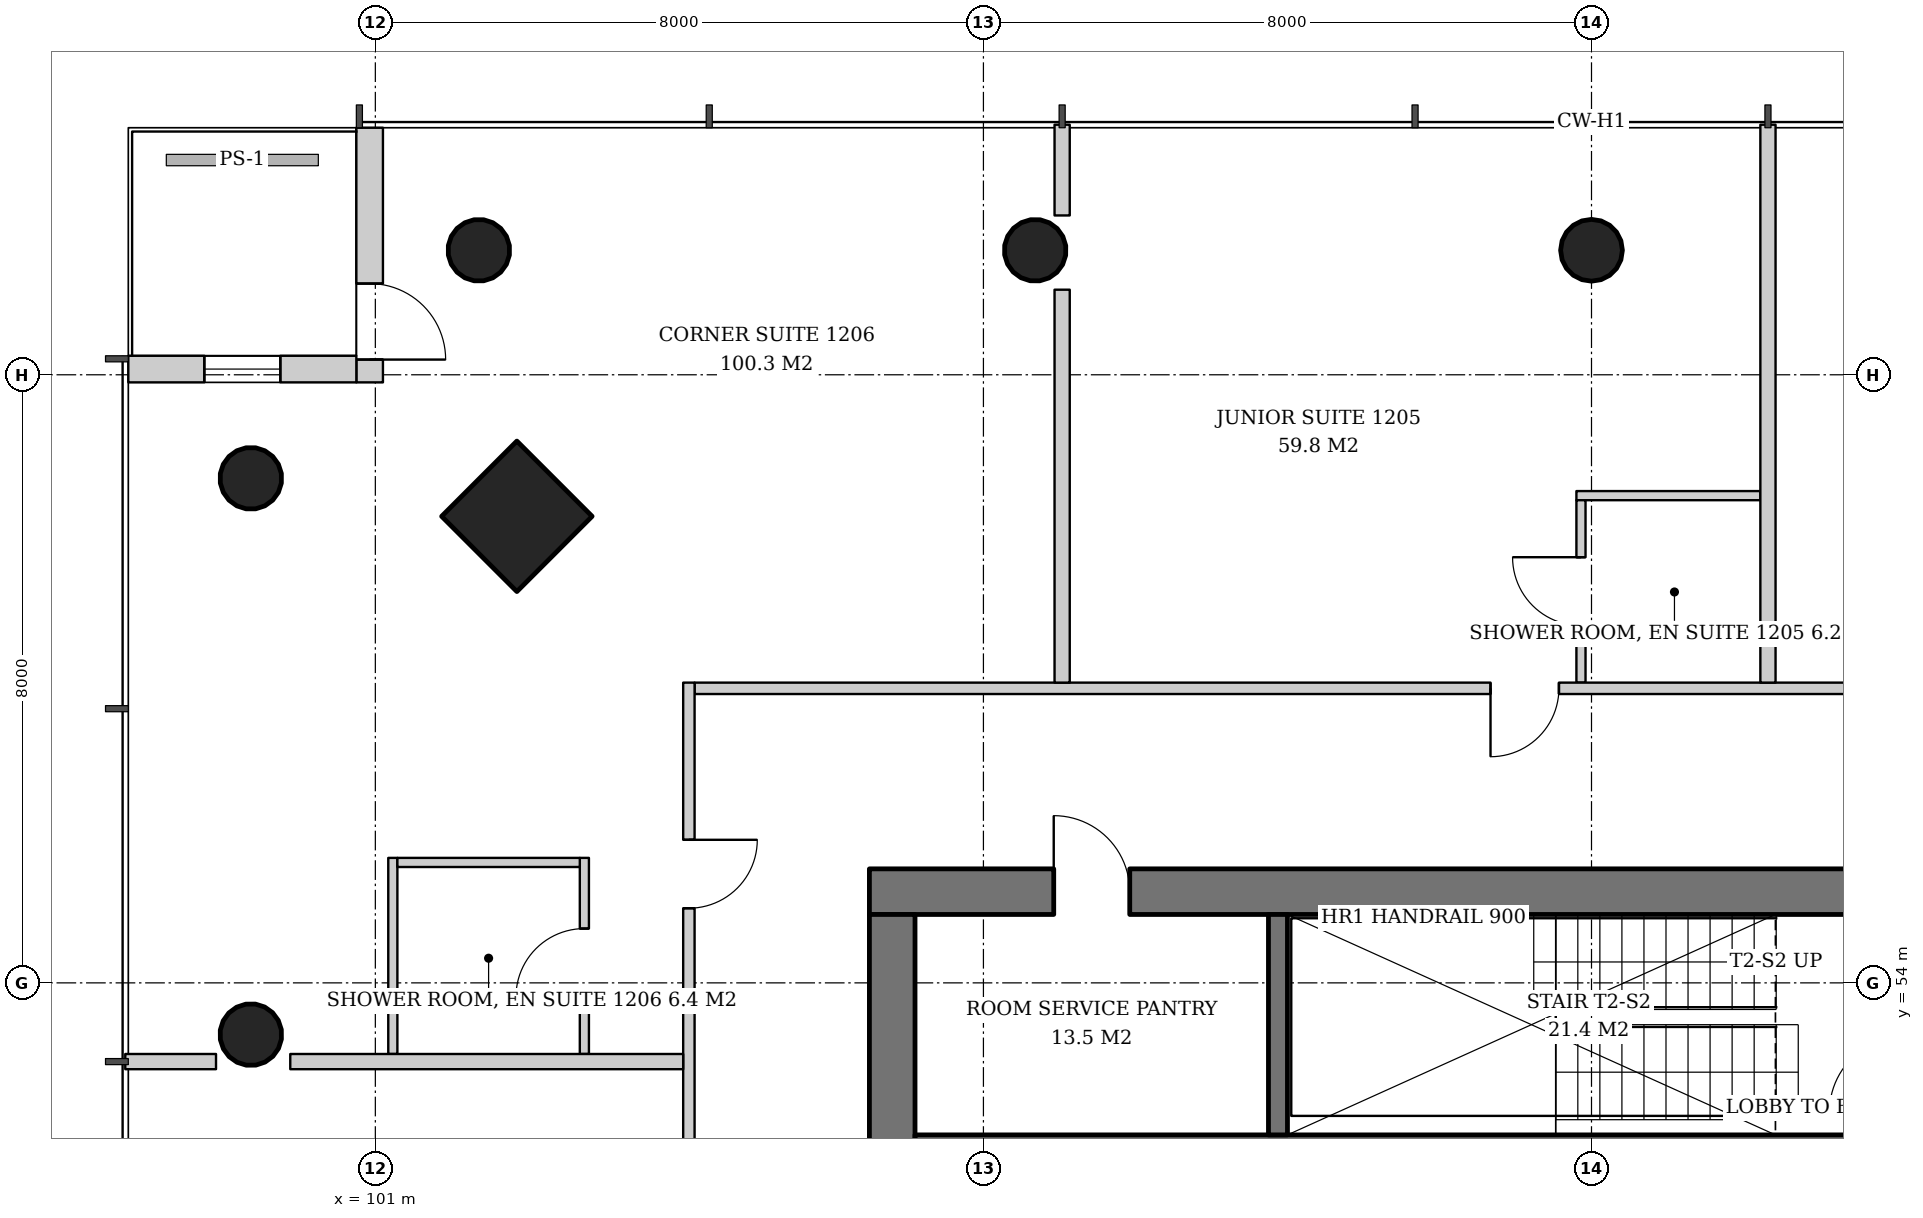
"""IFC4 building model, lengths in metres.
Left out: names, types, materials, properties, quantities, classifications, styles, units other than length and angle.
Written with IfcOpenShell. Run it as: python <this file> out.ifc"""

import sys

from ifc_helpers import new_model, si_unit, direction, frame, frame_2d, origin, origin_2d, place, context, subcontext, project, spatial, rectangle, hollow_circle, extrude, element, fill, save


model = new_model("IFC4")
c1 = context("Model", 3, precision=1e-05, world=origin(), true_north=direction((0.0, 1.0)))
c2 = subcontext(c1, "Body", "Model", "MODEL_VIEW")
j1 = project(units=[si_unit("LENGTHUNIT", "METRE"), si_unit("PLANEANGLEUNIT", "RADIAN")], contexts=[c1])
p1 = place(None, origin())
s1 = spatial("IfcSite", under=j1, at=p1, CompositionType="ELEMENT")
p2 = place(p1, origin())
s2 = spatial("IfcBuilding", under=s1, at=p2, CompositionType="ELEMENT")
p3 = place(p2, frame((0.0, 0.0, 51.4)))
s3 = spatial("IfcBuildingStorey", under=s2, at=p3, CompositionType="ELEMENT", Elevation=51.4)
p4 = place(p3, frame((102.81, 60.19, 0.0), z_axis=(0.043029647111, -0.043029647111, 0.998146732169), x_axis=(0.707106781187, 0.707106781187, 0.0)))
e1 = element("IfcColumn", 1, at=p4, inside=s3, PredefinedType="COLUMN", context=c2, shape_type="SweptSolid", body=[
    extrude(rectangle(XDim=1.4, YDim=1.4, at=origin_2d()), origin(), (0.0, 0.0, 1.0), 3.807),
])
p5 = place(p3, frame((102.31, 63.69, 0.0), z_axis=(0.043029647111, -0.043029647111, 0.998146732169), x_axis=(0.707106781187, 0.707106781187, 0.0)))
e2 = element("IfcColumn", 2, at=p5, inside=s3, PredefinedType="COLUMN", context=c2, shape_type="SweptSolid", body=[
    extrude(hollow_circle(Radius=0.406, WallThickness=0.03, at=origin_2d()), origin(), (0.0, 0.0, 1.0), 3.807),
])
p6 = place(p3, frame((117.0, 63.69, 0.0), z_axis=(0.0, -0.043069538298, 0.999072076915), x_axis=(1.0, 0.0, 0.0)))
e3 = element("IfcColumn", 3, at=p6, inside=s3, PredefinedType="COLUMN", context=c2, shape_type="SweptSolid", body=[
    extrude(hollow_circle(Radius=0.406, WallThickness=0.03, at=origin_2d()), origin(), (0.0, 0.0, 1.0), 3.803),
])
p7 = place(p3, frame((109.655, 63.69, 0.0), z_axis=(0.021497706284, -0.043059584825, 0.998841188968), x_axis=(0.894693706707, 0.446680166538, 0.0)))
e4 = element("IfcColumn", 4, at=p7, inside=s3, PredefinedType="COLUMN", context=c2, shape_type="SweptSolid", body=[
    extrude(hollow_circle(Radius=0.406, WallThickness=0.03, at=origin_2d()), origin(), (0.0, 0.0, 1.0), 3.804),
])
p8 = place(p3, frame((99.31, 60.69, 0.0), z_axis=(0.043029647111, -0.043029647111, 0.998146732169), x_axis=(0.707106781187, 0.707106781187, 0.0)))
e5 = element("IfcColumn", 5, at=p8, inside=s3, PredefinedType="COLUMN", context=c2, shape_type="SweptSolid", body=[
    extrude(hollow_circle(Radius=0.406, WallThickness=0.03, at=origin_2d()), origin(), (0.0, 0.0, 1.0), 3.807),
])
p9 = place(p3, frame((99.31, 53.345, 0.0), z_axis=(0.043059584825, -0.021497706284, 0.998841188968), x_axis=(0.446680166538, 0.894693706707, 0.0)))
e6 = element("IfcColumn", 6, at=p9, inside=s3, PredefinedType="COLUMN", context=c2, shape_type="SweptSolid", body=[
    extrude(hollow_circle(Radius=0.406, WallThickness=0.03, at=origin_2d()), origin(), (0.0, 0.0, 1.0), 3.804),
])
p10 = place(p3, frame((107.5, 55.2, 0.0), z_axis=(0.0, 0.0, 1.0), x_axis=(1.0, 0.0, 0.0)))
e7 = element("IfcWall", 7, at=p10, inside=s3, PredefinedType="SHEAR", context=c2, shape_type="SweptSolid", body=[
    extrude(rectangle(XDim=19.0, YDim=0.6, at=frame_2d((9.5, 0.0))), origin(), (0.0, 0.0, 1.0), 3.8),
])
p11 = place(p10, frame((14.14, 0.0, 0.0)))
e8 = element("IfcOpeningElement", 8, at=p11, cuts=e7, PredefinedType="OPENING", context=c2, shape_type="SweptSolid", body=[
    extrude(rectangle(XDim=1.0, YDim=2.1, at=frame_2d((0.5, 1.05))), frame((0.0, 0.31, 0.0), z_axis=(0.0, -1.0, 0.0), x_axis=(1.0, 0.0, 0.0)), (0.0, 0.0, 1.0), 0.62),
])
p12 = place(p10, frame((2.425, 0.0, 0.0)))
e9 = element("IfcOpeningElement", 9, at=p12, cuts=e7, PredefinedType="OPENING", context=c2, shape_type="SweptSolid", body=[
    extrude(rectangle(XDim=1.0, YDim=2.1, at=frame_2d((0.5, 1.05))), frame((0.0, 0.31, 0.0), z_axis=(0.0, -1.0, 0.0), x_axis=(1.0, 0.0, 0.0)), (0.0, 0.0, 1.0), 0.62),
])
p13 = place(p3, frame((107.8, 37.1, 0.0), z_axis=(0.0, 0.0, 1.0), x_axis=(0.0, 1.0, 0.0)))
e10 = element("IfcWall", 10, at=p13, inside=s3, PredefinedType="SHEAR", context=c2, shape_type="SweptSolid", body=[
    extrude(rectangle(XDim=17.8, YDim=0.6, at=frame_2d((8.9, 0.0))), origin(), (0.0, 0.0, 1.0), 3.8),
])
p14 = place(p13, frame((8.0, 0.0, 0.0)))
e11 = element("IfcOpeningElement", 11, at=p14, cuts=e10, PredefinedType="OPENING", context=c2, shape_type="SweptSolid", body=[
    extrude(rectangle(XDim=1.8, YDim=2.4, at=frame_2d((0.9, 1.2))), frame((0.0, 0.31, 0.0), z_axis=(0.0, -1.0, 0.0), x_axis=(1.0, 0.0, 0.0)), (0.0, 0.0, 1.0), 0.62),
])
p15 = place(p3, frame((108.1, 51.8, 0.0), z_axis=(0.0, 0.0, 1.0), x_axis=(1.0, 0.0, 0.0)))
e12 = element("IfcWall", 12, at=p15, inside=s3, PredefinedType="SHEAR", context=c2, shape_type="SweptSolid", body=[
    extrude(rectangle(XDim=17.8, YDim=0.4, at=frame_2d((8.9, 0.0))), origin(), (0.0, 0.0, 1.0), 3.8),
])
p16 = place(p3, frame((100.925, 65.25, 0.0), z_axis=(0.0, 0.0, 1.0), x_axis=(0.0, -1.0, 0.0)))
e13 = element("IfcWall", 13, at=p16, inside=s3, PredefinedType="SOLIDWALL", context=c2, shape_type="SweptSolid", body=[
    extrude(rectangle(XDim=3.35, YDim=0.35, at=frame_2d((1.675, 0.0))), origin(), (0.0, 0.0, 1.0), 3.6),
])
p17 = place(p16, frame((2.05, 0.0, 0.0)))
e14 = element("IfcOpeningElement", 14, at=p17, cuts=e13, PredefinedType="OPENING", context=c2, shape_type="SweptSolid", body=[
    extrude(rectangle(XDim=1.0, YDim=2.4, at=frame_2d((0.5, 1.2))), frame((0.0, 0.185, 0.0), z_axis=(0.0, -1.0, 0.0), x_axis=(1.0, 0.0, 0.0)), (0.0, 0.0, 1.0), 0.37),
])
p18 = place(p3, frame((100.75, 62.075, 0.0), z_axis=(0.0, 0.0, 1.0), x_axis=(-1.0, 0.0, 0.0)))
e15 = element("IfcWall", 15, at=p18, inside=s3, PredefinedType="SOLIDWALL", context=c2, shape_type="SweptSolid", body=[
    extrude(rectangle(XDim=3.0, YDim=0.35, at=frame_2d((1.5, 0.0))), origin(), (0.0, 0.0, 1.0), 3.6),
])
p19 = place(p18, frame((1.0, 0.0, 0.9)))
e16 = element("IfcOpeningElement", 16, at=p19, cuts=e15, PredefinedType="OPENING", context=c2, shape_type="SweptSolid", body=[
    extrude(rectangle(XDim=1.0, YDim=2.4, at=frame_2d((0.5, 1.2))), frame((0.0, 0.185, 0.0), z_axis=(0.0, -1.0, 0.0), x_axis=(1.0, 0.0, 0.0)), (0.0, 0.0, 1.0), 0.37),
])
p20 = place(p3, frame((112.875, 52.0, 0.0), z_axis=(0.0, 0.0, 1.0), x_axis=(0.0, 1.0, 0.0)))
e17 = element("IfcWall", 17, at=p20, inside=s3, PredefinedType="SHEAR", context=c2, shape_type="SweptSolid", body=[
    extrude(rectangle(XDim=2.9, YDim=0.25, at=frame_2d((1.45, 0.0))), origin(), (0.0, 0.0, 1.0), 3.8),
])
p21 = place(p3, frame((119.221, 60.41, 0.0), z_axis=(0.0, 0.0, 1.0), x_axis=(-1.0, 0.0, 0.0)))
e18 = element("IfcWall", 18, at=p21, inside=s3, PredefinedType="PARTITIONING", context=c2, shape_type="SweptSolid", body=[
    extrude(rectangle(XDim=2.42, YDim=0.12, at=frame_2d((1.21, 0.0))), origin(), (0.0, 0.0, 1.0), 2.847),
])
p22 = place(p3, frame((116.861, 57.95, 0.0), z_axis=(0.0, 0.0, 1.0), x_axis=(0.0, 1.0, 0.0)))
e19 = element("IfcWall", 19, at=p22, inside=s3, PredefinedType="PARTITIONING", context=c2, shape_type="SweptSolid", body=[
    extrude(rectangle(XDim=2.4, YDim=0.12, at=frame_2d((1.2, 0.0))), origin(), (0.0, 0.0, 1.0), 3.6),
])
p23 = place(p22, frame((0.75, 0.0, 0.0)))
e20 = element("IfcOpeningElement", 20, at=p23, cuts=e19, PredefinedType="OPENING", context=c2, shape_type="SweptSolid", body=[
    extrude(rectangle(XDim=0.9, YDim=2.1, at=frame_2d((0.45, 1.05))), frame((0.0, 0.07, 0.0), z_axis=(0.0, -1.0, 0.0), x_axis=(1.0, 0.0, 0.0)), (0.0, 0.0, 1.0), 0.14),
])
p24 = place(p3, frame((128.95, 57.875, 0.0), z_axis=(0.0, 0.0, 1.0), x_axis=(-1.0, 0.0, 0.0)))
e21 = element("IfcWall", 21, at=p24, inside=s3, PredefinedType="PARTITIONING", context=c2, shape_type="SweptSolid", body=[
    extrude(rectangle(XDim=23.75, YDim=0.15, at=frame_2d((11.875, 0.0))), origin(), (0.0, 0.0, 1.0), 2.8),
])
p25 = place(p24, frame((2.068, 0.0, 0.0)))
e22 = element("IfcOpeningElement", 22, at=p25, cuts=e21, PredefinedType="OPENING", context=c2, shape_type="SweptSolid", body=[
    extrude(rectangle(XDim=0.9, YDim=2.1, at=frame_2d((0.45, 1.05))), frame((0.0, 0.085, 0.0), z_axis=(0.0, -1.0, 0.0), x_axis=(1.0, 0.0, 0.0)), (0.0, 0.0, 1.0), 0.17),
])
p26 = place(p24, frame((12.379, 0.0, 0.0)))
e23 = element("IfcOpeningElement", 23, at=p26, cuts=e21, PredefinedType="OPENING", context=c2, shape_type="SweptSolid", body=[
    extrude(rectangle(XDim=0.9, YDim=2.1, at=frame_2d((0.45, 1.05))), frame((0.0, 0.085, 0.0), z_axis=(0.0, -1.0, 0.0), x_axis=(1.0, 0.0, 0.0)), (0.0, 0.0, 1.0), 0.17),
])
p27 = place(p3, frame((119.322, 57.95, 0.0), z_axis=(0.0, 0.0, 1.0), x_axis=(0.0, 1.0, 0.0)))
e24 = element("IfcWall", 24, at=p27, inside=s3, PredefinedType="PARTITIONING", context=c2, shape_type="SweptSolid", body=[
    extrude(rectangle(XDim=7.34, YDim=0.2, at=frame_2d((3.67, 0.0))), origin(), (0.0, 0.0, 1.0), 3.05),
])
p28 = place(p3, frame((110.036, 57.95, 0.0), z_axis=(0.0, 0.0, 1.0), x_axis=(0.0, 1.0, 0.0)))
e25 = element("IfcWall", 25, at=p28, inside=s3, PredefinedType="PARTITIONING", context=c2, shape_type="SweptSolid", body=[
    extrude(rectangle(XDim=5.169, YDim=0.2, at=frame_2d((2.585, 0.0))), origin(), (0.0, 0.0, 1.0), 3.6),
])
p29 = place(p3, frame((110.036, 64.096, 0.0), z_axis=(0.0, 0.0, 1.0), x_axis=(0.0, 1.0, 0.0)))
e26 = element("IfcWall", 26, at=p29, inside=s3, PredefinedType="PARTITIONING", context=c2, shape_type="SweptSolid", body=[
    extrude(rectangle(XDim=1.194, YDim=0.2, at=frame_2d((0.597, 0.0))), origin(), (0.0, 0.0, 1.0), 3.6),
])
p30 = place(p3, frame((103.75, 53.064, 0.0), z_axis=(0.0, 0.0, 1.0), x_axis=(0.0, 1.0, 0.0)))
e27 = element("IfcWall", 27, at=p30, inside=s3, PredefinedType="PARTITIONING", context=c2, shape_type="SweptSolid", body=[
    extrude(rectangle(XDim=2.58, YDim=0.12, at=frame_2d((1.29, 0.0))), origin(), (0.0, 0.0, 1.0), 2.8),
])
p31 = place(p30, frame((0.75, 0.0, 0.0)))
e28 = element("IfcOpeningElement", 28, at=p31, cuts=e27, PredefinedType="OPENING", context=c2, shape_type="SweptSolid", body=[
    extrude(rectangle(XDim=0.9, YDim=2.1, at=frame_2d((0.45, 1.05))), frame((0.0, 0.07, 0.0), z_axis=(0.0, -1.0, 0.0), x_axis=(1.0, 0.0, 0.0)), (0.0, 0.0, 1.0), 0.14),
])
p32 = place(p3, frame((101.23, 53.064, 0.0), z_axis=(0.0, 0.0, 1.0), x_axis=(0.0, 1.0, 0.0)))
e29 = element("IfcWall", 29, at=p32, inside=s3, PredefinedType="PARTITIONING", context=c2, shape_type="SweptSolid", body=[
    extrude(rectangle(XDim=2.58, YDim=0.12, at=frame_2d((1.29, 0.0))), origin(), (0.0, 0.0, 1.0), 2.8),
])
p33 = place(p3, frame((103.69, 55.584, 0.0), z_axis=(0.0, 0.0, 1.0), x_axis=(-1.0, 0.0, 0.0)))
e30 = element("IfcWall", 30, at=p33, inside=s3, PredefinedType="PARTITIONING", context=c2, shape_type="SweptSolid", body=[
    extrude(rectangle(XDim=2.4, YDim=0.12, at=frame_2d((1.2, 0.0))), origin(), (0.0, 0.0, 1.0), 3.6),
])
p34 = place(p3, frame((105.125, 57.95, 0.0), z_axis=(0.0, 0.0, 1.0), x_axis=(0.0, -1.0, 0.0)))
e31 = element("IfcWall", 31, at=p34, inside=s3, PredefinedType="PARTITIONING", context=c2, shape_type="SweptSolid", body=[
    extrude(rectangle(XDim=23.75, YDim=0.15, at=frame_2d((11.875, 0.0))), origin(), (0.0, 0.0, 1.0), 2.8),
])
p35 = place(p34, frame((2.068, 0.0, 0.0)))
e32 = element("IfcOpeningElement", 32, at=p35, cuts=e31, PredefinedType="OPENING", context=c2, shape_type="SweptSolid", body=[
    extrude(rectangle(XDim=0.9, YDim=2.1, at=frame_2d((0.45, 1.05))), frame((0.0, 0.085, 0.0), z_axis=(0.0, -1.0, 0.0), x_axis=(1.0, 0.0, 0.0)), (0.0, 0.0, 1.0), 0.17),
])
p36 = place(p34, frame((7.686, 0.0, 0.0)))
e33 = element("IfcOpeningElement", 33, at=p36, cuts=e31, PredefinedType="OPENING", context=c2, shape_type="SweptSolid", body=[
    extrude(rectangle(XDim=1.0, YDim=2.1, at=frame_2d((0.5, 1.05))), frame((0.0, 0.085, 0.0), z_axis=(0.0, -1.0, 0.0), x_axis=(1.0, 0.0, 0.0)), (0.0, 0.0, 1.0), 0.17),
])
p37 = place(p34, frame((12.379, 0.0, 0.0)))
e34 = element("IfcOpeningElement", 34, at=p37, cuts=e31, PredefinedType="OPENING", context=c2, shape_type="SweptSolid", body=[
    extrude(rectangle(XDim=0.9, YDim=2.1, at=frame_2d((0.45, 1.05))), frame((0.0, 0.085, 0.0), z_axis=(0.0, -1.0, 0.0), x_axis=(1.0, 0.0, 0.0)), (0.0, 0.0, 1.0), 0.17),
])
p38 = place(p34, frame((15.264, 0.0, 0.0)))
e35 = element("IfcOpeningElement", 35, at=p38, cuts=e31, PredefinedType="OPENING", context=c2, shape_type="SweptSolid", body=[
    extrude(rectangle(XDim=0.9, YDim=2.1, at=frame_2d((0.45, 1.05))), frame((0.0, 0.085, 0.0), z_axis=(0.0, -1.0, 0.0), x_axis=(1.0, 0.0, 0.0)), (0.0, 0.0, 1.0), 0.17),
])
p39 = place(p3, frame((105.05, 52.964, 0.0), z_axis=(0.0, 0.0, 1.0), x_axis=(-1.0, 0.0, 0.0)))
e36 = element("IfcWall", 36, at=p39, inside=s3, PredefinedType="PARTITIONING", context=c2, shape_type="SweptSolid", body=[
    extrude(rectangle(XDim=5.169, YDim=0.2, at=frame_2d((2.585, 0.0))), origin(), (0.0, 0.0, 1.0), 3.6),
])
p40 = place(p3, frame((98.904, 52.964, 0.0), z_axis=(0.0, 0.0, 1.0), x_axis=(-1.0, 0.0, 0.0)))
e37 = element("IfcWall", 37, at=p40, inside=s3, PredefinedType="PARTITIONING", context=c2, shape_type="SweptSolid", body=[
    extrude(rectangle(XDim=1.194, YDim=0.2, at=frame_2d((0.597, 0.0))), origin(), (0.0, 0.0, 1.0), 3.6),
])
p41 = place(p17, origin())
e38 = element("IfcDoor", 38, at=p41, inside=s3, OperationType="SINGLE_SWING_RIGHT", PredefinedType="DOOR", context=c2, shape_type="SweptSolid", body=[
    extrude(rectangle(XDim=1.0, YDim=2.4, at=frame_2d((0.5, 1.2))), frame((0.0, 0.025, 0.0), z_axis=(0.0, -1.0, 0.0), x_axis=(1.0, 0.0, 0.0)), (0.0, 0.0, 1.0), 0.05),
])
fill(e14, e38)
p42 = place(p19, origin())
e39 = element("IfcWindow", 39, at=p42, inside=s3, PartitioningType="SINGLE_PANEL", PredefinedType="WINDOW", context=c2, shape_type="SweptSolid", body=[
    extrude(rectangle(XDim=1.0, YDim=2.4, at=frame_2d((0.5, 1.2))), frame((0.0, 0.03, 0.0), z_axis=(0.0, -1.0, 0.0), x_axis=(1.0, 0.0, 0.0)), (0.0, 0.0, 1.0), 0.06),
])
fill(e16, e39)
p43 = place(p12, origin())
e40 = element("IfcDoor", 40, at=p43, inside=s3, OperationType="SINGLE_SWING_LEFT", PredefinedType="DOOR", context=c2, shape_type="SweptSolid", body=[
    extrude(rectangle(XDim=1.0, YDim=2.1, at=frame_2d((0.5, 1.05))), frame((0.0, -0.24, 0.0), z_axis=(0.0, -1.0, 0.0), x_axis=(1.0, 0.0, 0.0)), (0.0, 0.0, 1.0), 0.05),
])
fill(e9, e40)
p44 = place(p23, origin())
e41 = element("IfcDoor", 41, at=p44, inside=s3, OperationType="SINGLE_SWING_RIGHT", PredefinedType="DOOR", context=c2, shape_type="SweptSolid", body=[
    extrude(rectangle(XDim=0.9, YDim=2.1, at=frame_2d((0.45, 1.05))), frame((0.0, 0.025, 0.0), z_axis=(0.0, -1.0, 0.0), x_axis=(1.0, 0.0, 0.0)), (0.0, 0.0, 1.0), 0.05),
])
fill(e20, e41)
p45 = place(p26, origin())
e42 = element("IfcDoor", 42, at=p45, inside=s3, OperationType="SINGLE_SWING_RIGHT", PredefinedType="DOOR", context=c2, shape_type="SweptSolid", body=[
    extrude(rectangle(XDim=0.9, YDim=2.1, at=frame_2d((0.45, 1.05))), frame((0.0, 0.025, 0.0), z_axis=(0.0, -1.0, 0.0), x_axis=(1.0, 0.0, 0.0)), (0.0, 0.0, 1.0), 0.05),
])
fill(e23, e42)
p46 = place(p31, origin())
e43 = element("IfcDoor", 43, at=p46, inside=s3, OperationType="SINGLE_SWING_LEFT", PredefinedType="DOOR", context=c2, shape_type="SweptSolid", body=[
    extrude(rectangle(XDim=0.9, YDim=2.1, at=frame_2d((0.45, 1.05))), frame((0.0, 0.025, 0.0), z_axis=(0.0, -1.0, 0.0), x_axis=(1.0, 0.0, 0.0)), (0.0, 0.0, 1.0), 0.05),
])
fill(e28, e43)
p47 = place(p35, origin())
e44 = element("IfcDoor", 44, at=p47, inside=s3, OperationType="SINGLE_SWING_LEFT", PredefinedType="DOOR", context=c2, shape_type="SweptSolid", body=[
    extrude(rectangle(XDim=0.9, YDim=2.1, at=frame_2d((0.45, 1.05))), frame((0.0, 0.025, 0.0), z_axis=(0.0, -1.0, 0.0), x_axis=(1.0, 0.0, 0.0)), (0.0, 0.0, 1.0), 0.05),
])
fill(e32, e44)
save(model, sys.argv[1])
